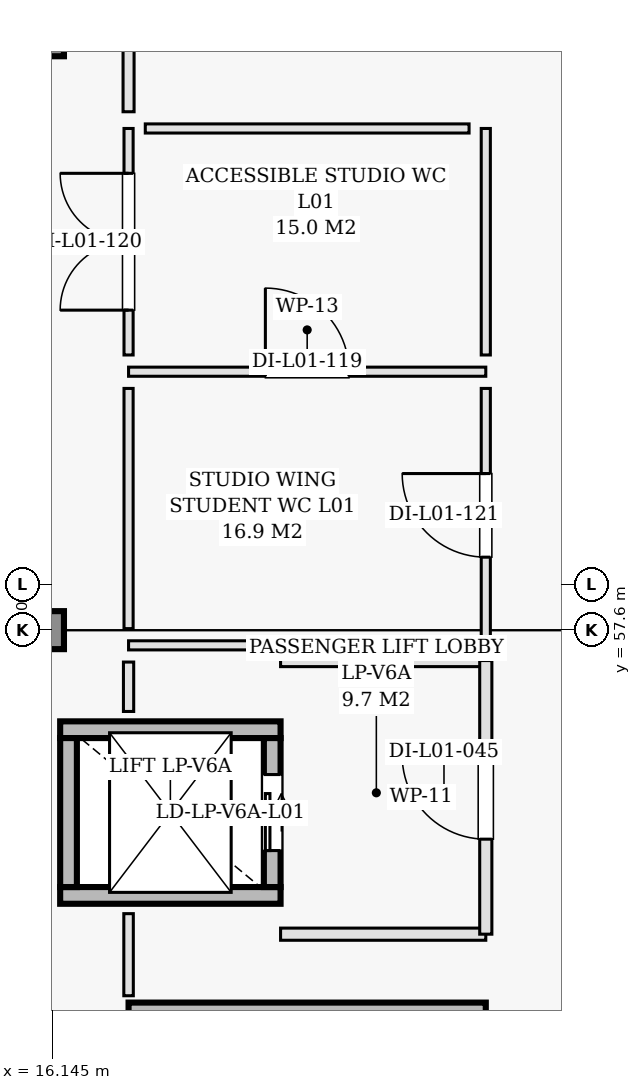
"""IFC4 building model, lengths in metres.
Left out: names, types, materials, properties, quantities, classifications, styles, units other than length and angle.
Written with IfcOpenShell. Run it as: python <this file> out.ifc"""

import sys

from ifc_helpers import new_model, si_unit, direction, frame, frame_2d, origin, origin_2d, place, context, subcontext, project, spatial, rectangle, extrude, element, fill, save


model = new_model("IFC4")
c1 = context("Model", 3, precision=1e-05, world=origin(), true_north=direction((0.0, 1.0)))
c2 = subcontext(c1, "Body", "Model", "MODEL_VIEW")
j1 = project(units=[si_unit("LENGTHUNIT", "METRE"), si_unit("PLANEANGLEUNIT", "RADIAN")], contexts=[c1])
p1 = place(None, origin())
s1 = spatial("IfcSite", under=j1, at=p1, CompositionType="ELEMENT")
p2 = place(p1, origin())
s2 = spatial("IfcBuilding", under=s1, at=p2, CompositionType="ELEMENT")
p3 = place(p2, frame((0.0, 0.0, 4.8)))
s3 = spatial("IfcBuildingStorey", under=s2, at=p3, CompositionType="ELEMENT", Elevation=4.8)
for number, where, z_axis, x_axis in (
    (1, (16.0, 57.6, 0.0), (0.0, 0.0, 1.0), (1.0, 0.0, 0.0)),
    (2, (16.0, 65.4, 0.0), (0.0, 0.0, 1.0), (1.0, 0.0, 0.0)),
):
    element("IfcColumn", number, at=place(p3, frame(where, z_axis=z_axis, x_axis=x_axis)), inside=s3, PredefinedType="COLUMN", context=c2, shape_type="SweptSolid", body=[
        extrude(rectangle(XDim=0.5, YDim=0.5, at=origin_2d()), origin(), (0.0, 0.0, 1.0), 4.8),
    ])
p4 = place(p3, frame((17.15, 52.55, 0.0), z_axis=(0.0, 0.0, 1.0), x_axis=(1.0, 0.0, 0.0)))
e3 = element("IfcWall", 3, at=p4, inside=s3, PredefinedType="SHEAR", context=c2, shape_type="SweptSolid", body=[
    extrude(rectangle(XDim=4.7, YDim=0.3, at=frame_2d((2.35, 0.0))), origin(), (0.0, 0.0, 1.0), 4.48),
])
for number, where, z_axis, x_axis in (
    (4, (16.25, 54.11, 0.0), (0.0, 0.0, 1.0), (1.0, 0.0, 0.0)),
    (5, (16.25, 56.29, 0.0), (0.0, 0.0, 1.0), (1.0, 0.0, 0.0)),
):
    element("IfcWall", number, at=place(p3, frame(where, z_axis=z_axis, x_axis=x_axis)), inside=s3, PredefinedType="SHEAR", context=c2, shape_type="SweptSolid", body=[
        extrude(rectangle(XDim=2.9, YDim=0.22, at=frame_2d((1.45, 0.0))), origin(), (0.0, 0.0, 1.0), 4.48),
    ])
p5 = place(p3, frame((16.36, 54.22, 0.0), z_axis=(0.0, 0.0, 1.0), x_axis=(0.0, 1.0, 0.0)))
e6 = element("IfcWall", 6, at=p5, inside=s3, PredefinedType="SHEAR", context=c2, shape_type="SweptSolid", body=[
    extrude(rectangle(XDim=1.96, YDim=0.22, at=frame_2d((0.98, 0.0))), origin(), (0.0, 0.0, 1.0), 4.48),
])
p6 = place(p3, frame((19.04, 54.22, 0.0), z_axis=(0.0, 0.0, 1.0), x_axis=(0.0, 1.0, 0.0)))
e7 = element("IfcWall", 7, at=p6, inside=s3, PredefinedType="SHEAR", context=c2, shape_type="SweptSolid", body=[
    extrude(rectangle(XDim=1.96, YDim=0.22, at=frame_2d((0.98, 0.0))), origin(), (0.0, 0.0, 1.0), 4.48),
])
p7 = place(p6, frame((0.48, 0.0, 0.0)))
e8 = element("IfcOpeningElement", 8, at=p7, cuts=e7, PredefinedType="OPENING", context=c2, shape_type="SweptSolid", body=[
    extrude(rectangle(XDim=1.0, YDim=2.15, at=frame_2d((0.5, 1.075))), frame((0.0, 0.12, 0.0), z_axis=(0.0, -1.0, 0.0), x_axis=(1.0, 0.0, 0.0)), (0.0, 0.0, 1.0), 0.24),
])
for number, where, z_axis, x_axis in (
    (9, (19.15, 53.6, 0.0), (0.0, 0.0, 1.0), (1.0, 0.0, 0.0)),
    (10, (19.15, 57.2, 0.0), (0.0, 0.0, 1.0), (1.0, 0.0, 0.0)),
):
    element("IfcWall", number, at=place(p3, frame(where, z_axis=z_axis, x_axis=x_axis)), inside=s3, PredefinedType="PARTITIONING", context=c2, shape_type="SweptSolid", body=[
        extrude(rectangle(XDim=2.7, YDim=0.16, at=frame_2d((1.35, 0.0))), origin(), (0.0, 0.0, 1.0), 4.48),
    ])
p8 = place(p3, frame((21.85, 53.6, 0.0), z_axis=(0.0, 0.0, 1.0), x_axis=(0.0, 1.0, 0.0)))
e11 = element("IfcWall", 11, at=p8, inside=s3, PredefinedType="PARTITIONING", context=c2, shape_type="SweptSolid", body=[
    extrude(rectangle(XDim=3.6, YDim=0.16, at=frame_2d((1.8, 0.0))), origin(), (0.0, 0.0, 1.0), 4.48),
])
p9 = place(p8, frame((1.25, 0.0, 0.0)))
e12 = element("IfcOpeningElement", 12, at=p9, cuts=e11, PredefinedType="OPENING", context=c2, shape_type="SweptSolid", body=[
    extrude(rectangle(XDim=1.1, YDim=2.15, at=frame_2d((0.55, 1.075))), frame((0.0, 0.09, 0.0), z_axis=(0.0, -1.0, 0.0), x_axis=(1.0, 0.0, 0.0)), (0.0, 0.0, 1.0), 0.18),
])
p10 = place(p3, frame((17.15, 61.0, 0.0), z_axis=(0.0, 0.0, 1.0), x_axis=(1.0, 0.0, 0.0)))
e13 = element("IfcWall", 13, at=p10, inside=s3, PredefinedType="PARTITIONING", context=c2, shape_type="SweptSolid", body=[
    extrude(rectangle(XDim=4.7, YDim=0.12, at=frame_2d((2.35, 0.0))), origin(), (0.0, 0.0, 1.0), 4.48),
])
p11 = place(p10, frame((1.8, 0.0, 0.0)))
e14 = element("IfcOpeningElement", 14, at=p11, cuts=e13, PredefinedType="OPENING", context=c2, shape_type="SweptSolid", body=[
    extrude(rectangle(XDim=1.1, YDim=2.15, at=frame_2d((0.55, 1.075))), frame((0.0, 0.07, 0.0), z_axis=(0.0, -1.0, 0.0), x_axis=(1.0, 0.0, 0.0)), (0.0, 0.0, 1.0), 0.14),
])
p12 = place(p3, frame((21.85, 61.22, 0.0), z_axis=(0.0, 0.0, 1.0), x_axis=(0.0, 1.0, 0.0)))
e15 = element("IfcWall", 15, at=p12, inside=s3, PredefinedType="PARTITIONING", context=c2, shape_type="SweptSolid", body=[
    extrude(rectangle(XDim=2.98, YDim=0.12, at=frame_2d((1.49, 0.0))), origin(), (0.0, 0.0, 1.0), 4.025),
])
p13 = place(p3, frame((17.15, 61.22, 0.0), z_axis=(0.0, 0.0, 1.0), x_axis=(0.0, 1.0, 0.0)))
e16 = element("IfcWall", 16, at=p13, inside=s3, PredefinedType="PARTITIONING", context=c2, shape_type="SweptSolid", body=[
    extrude(rectangle(XDim=2.98, YDim=0.12, at=frame_2d((1.49, 0.0))), origin(), (0.0, 0.0, 1.0), 4.025),
])
p14 = place(p13, frame((0.59, 0.0, 0.0)))
e17 = element("IfcOpeningElement", 17, at=p14, cuts=e16, PredefinedType="OPENING", context=c2, shape_type="SweptSolid", body=[
    extrude(rectangle(XDim=1.8, YDim=2.2, at=frame_2d((0.9, 1.1))), frame((0.0, 0.07, 0.0), z_axis=(0.0, -1.0, 0.0), x_axis=(1.0, 0.0, 0.0)), (0.0, 0.0, 1.0), 0.14),
])
p15 = place(p3, frame((17.37, 64.2, 0.0), z_axis=(0.0, 0.0, 1.0), x_axis=(1.0, 0.0, 0.0)))
e18 = element("IfcWall", 18, at=p15, inside=s3, PredefinedType="PARTITIONING", context=c2, shape_type="SweptSolid", body=[
    extrude(rectangle(XDim=4.26, YDim=0.12, at=frame_2d((2.13, 0.0))), origin(), (0.0, 0.0, 1.0), 4.48),
])
p16 = place(p3, frame((21.85, 57.44, 0.0), z_axis=(0.0, 0.0, 1.0), x_axis=(0.0, 1.0, 0.0)))
e19 = element("IfcWall", 19, at=p16, inside=s3, PredefinedType="PARTITIONING", context=c2, shape_type="SweptSolid", body=[
    extrude(rectangle(XDim=3.34, YDim=0.12, at=frame_2d((1.67, 0.0))), origin(), (0.0, 0.0, 1.0), 3.765),
])
p17 = place(p16, frame((1.12, 0.0, 0.0)))
e20 = element("IfcOpeningElement", 20, at=p17, cuts=e19, PredefinedType="OPENING", context=c2, shape_type="SweptSolid", body=[
    extrude(rectangle(XDim=1.1, YDim=2.15, at=frame_2d((0.55, 1.075))), frame((0.0, 0.07, 0.0), z_axis=(0.0, -1.0, 0.0), x_axis=(1.0, 0.0, 0.0)), (0.0, 0.0, 1.0), 0.14),
])
p18 = place(p3, frame((17.15, 57.4, 0.0), z_axis=(0.0, 0.0, 1.0), x_axis=(1.0, 0.0, 0.0)))
e21 = element("IfcWall", 21, at=p18, inside=s3, PredefinedType="PARTITIONING", context=c2, shape_type="SweptSolid", body=[
    extrude(rectangle(XDim=1.867, YDim=0.12, at=frame_2d((0.934, 0.0))), origin(), (0.0, 0.0, 1.0), 3.765),
])
p19 = place(p3, frame((17.15, 57.62, 0.0), z_axis=(0.0, 0.0, 1.0), x_axis=(0.0, 1.0, 0.0)))
e22 = element("IfcWall", 22, at=p19, inside=s3, PredefinedType="PARTITIONING", context=c2, shape_type="SweptSolid", body=[
    extrude(rectangle(XDim=3.16, YDim=0.12, at=frame_2d((1.58, 0.0))), origin(), (0.0, 0.0, 1.0), 3.765),
])
p20 = place(p3, frame((17.15, 64.42, 0.0), z_axis=(0.0, 0.0, 1.0), x_axis=(0.0, 1.0, 0.0)))
e23 = element("IfcWall", 23, at=p20, inside=s3, PredefinedType="PARTITIONING", context=c2, shape_type="SweptSolid", body=[
    extrude(rectangle(XDim=0.98, YDim=0.145, at=frame_2d((0.49, 0.0))), origin(), (0.0, 0.0, 1.0), 3.765),
])
p21 = place(p3, frame((17.15, 56.53, 0.0), z_axis=(0.0, 0.0, 1.0), x_axis=(0.0, 1.0, 0.0)))
e24 = element("IfcWall", 24, at=p21, inside=s3, PredefinedType="PARTITIONING", context=c2, shape_type="SweptSolid", body=[
    extrude(rectangle(XDim=0.65, YDim=0.135, at=frame_2d((0.325, 0.0))), origin(), (0.0, 0.0, 1.0), 4.48),
])
p22 = place(p3, frame((17.15, 52.79, 0.0), z_axis=(0.0, 0.0, 1.0), x_axis=(0.0, 1.0, 0.0)))
e25 = element("IfcWall", 25, at=p22, inside=s3, PredefinedType="PARTITIONING", context=c2, shape_type="SweptSolid", body=[
    extrude(rectangle(XDim=1.08, YDim=0.125, at=frame_2d((0.54, 0.0))), origin(), (0.0, 0.0, 1.0), 4.48),
])
p23 = place(p7, origin())
e26 = element("IfcDoor", 26, at=p23, inside=s3, OperationType="SLIDING_TO_LEFT", PredefinedType="DOOR", context=c2, shape_type="SweptSolid", body=[
    extrude(rectangle(XDim=1.0, YDim=2.15, at=frame_2d((0.5, 1.075))), frame((0.0, 0.025, 0.0), z_axis=(0.0, -1.0, 0.0), x_axis=(1.0, 0.0, 0.0)), (0.0, 0.0, 1.0), 0.05),
])
fill(e8, e26)
p24 = place(p9, origin())
e27 = element("IfcDoor", 27, at=p24, inside=s3, OperationType="SINGLE_SWING_RIGHT", PredefinedType="DOOR", context=c2, shape_type="SweptSolid", body=[
    extrude(rectangle(XDim=1.1, YDim=2.15, at=frame_2d((0.55, 1.075))), frame((0.0, 0.025, 0.0), z_axis=(0.0, -1.0, 0.0), x_axis=(1.0, 0.0, 0.0)), (0.0, 0.0, 1.0), 0.05),
])
fill(e12, e27)
p25 = place(p11, origin())
e28 = element("IfcDoor", 28, at=p25, inside=s3, OperationType="SINGLE_SWING_LEFT", PredefinedType="DOOR", context=c2, shape_type="SweptSolid", body=[
    extrude(rectangle(XDim=1.1, YDim=2.15, at=frame_2d((0.55, 1.075))), frame((0.0, 0.025, 0.0), z_axis=(0.0, -1.0, 0.0), x_axis=(1.0, 0.0, 0.0)), (0.0, 0.0, 1.0), 0.05),
])
fill(e14, e28)
p26 = place(p14, origin())
e29 = element("IfcDoor", 29, at=p26, inside=s3, OperationType="DOUBLE_DOOR_SINGLE_SWING", PredefinedType="DOOR", context=c2, shape_type="SweptSolid", body=[
    extrude(rectangle(XDim=1.8, YDim=2.2, at=frame_2d((0.9, 1.1))), frame((0.0, 0.025, 0.0), z_axis=(0.0, -1.0, 0.0), x_axis=(1.0, 0.0, 0.0)), (0.0, 0.0, 1.0), 0.05),
])
fill(e17, e29)
p27 = place(p17, origin())
e30 = element("IfcDoor", 30, at=p27, inside=s3, OperationType="SINGLE_SWING_RIGHT", PredefinedType="DOOR", context=c2, shape_type="SweptSolid", body=[
    extrude(rectangle(XDim=1.1, YDim=2.15, at=frame_2d((0.55, 1.075))), frame((0.0, 0.025, 0.0), z_axis=(0.0, -1.0, 0.0), x_axis=(1.0, 0.0, 0.0)), (0.0, 0.0, 1.0), 0.05),
])
fill(e20, e30)
save(model, sys.argv[1])
